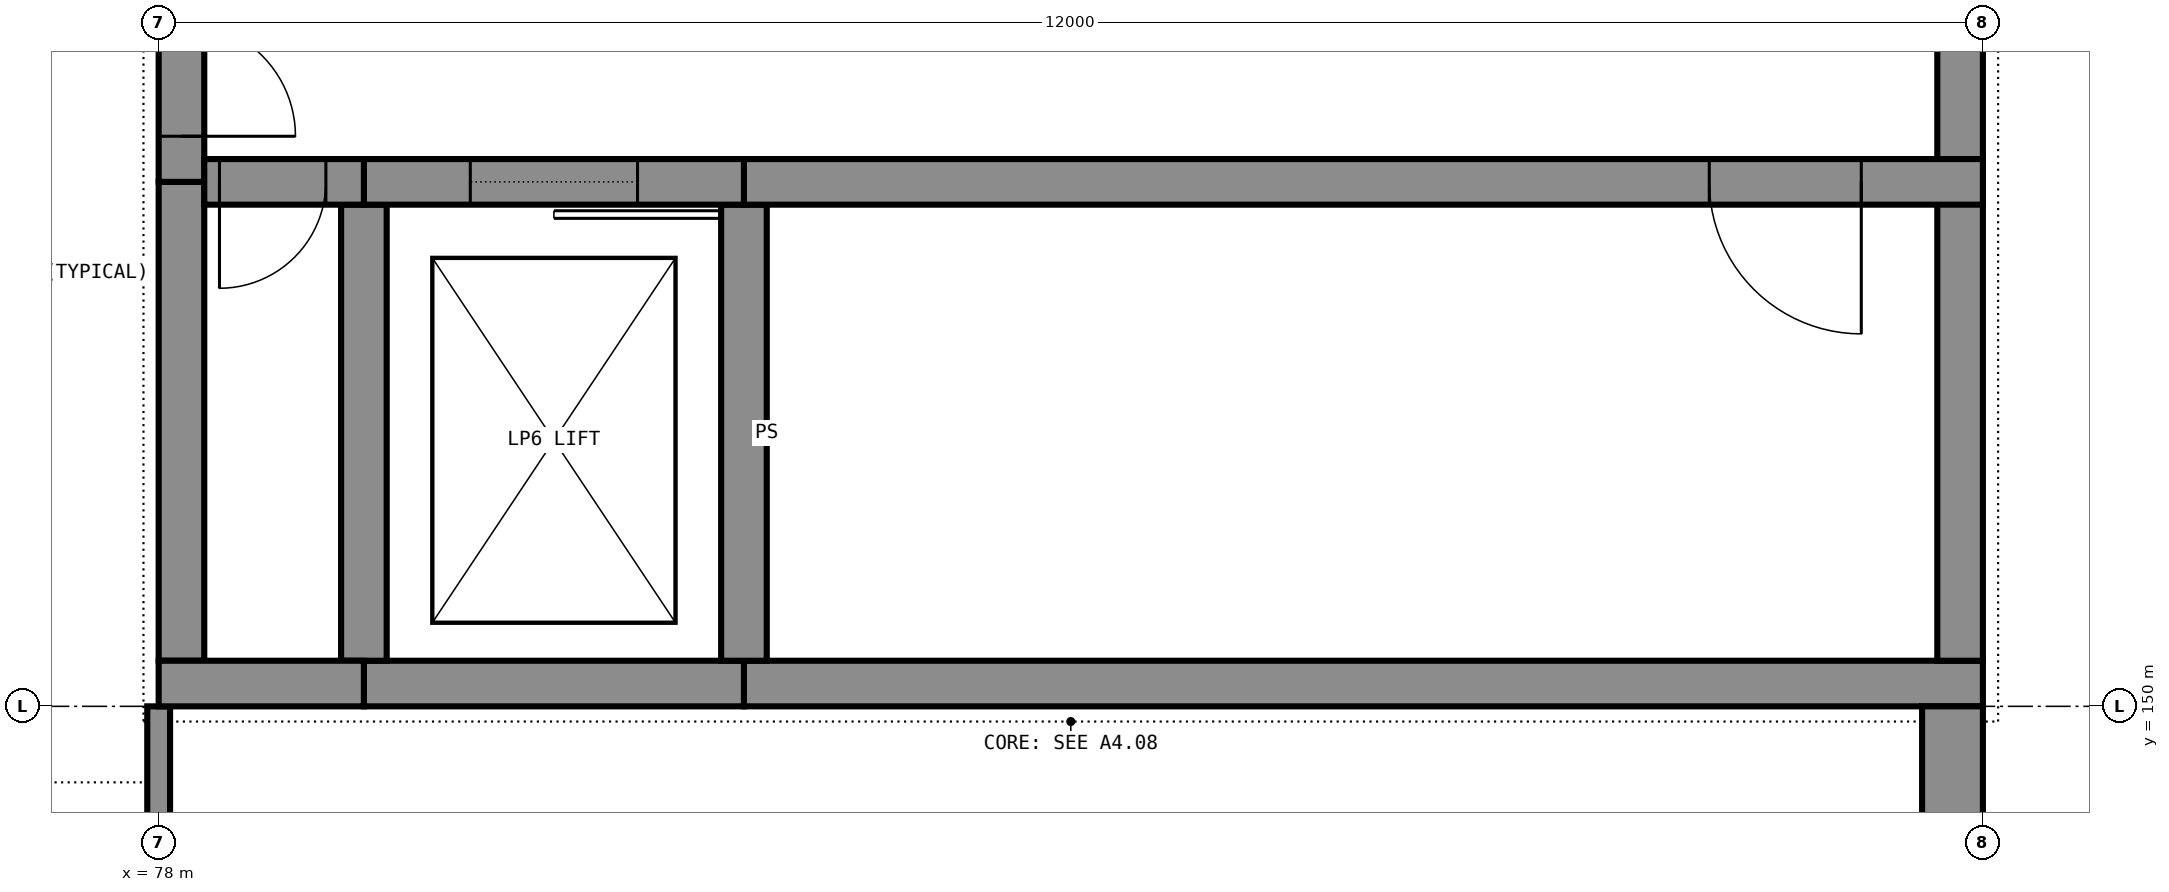
"""IFC4 building model, lengths in metres.
Left out: names, types, materials, properties, quantities, classifications, styles, units other than length and angle.
Written with IfcOpenShell. Run it as: python <this file> out.ifc"""

import sys

from ifc_helpers import new_model, si_unit, direction, frame, frame_2d, origin, place, context, subcontext, project, spatial, rectangle, extrude, element, fill, save


model = new_model("IFC4")
c1 = context("Model", 3, precision=1e-05, world=origin(), true_north=direction((0.0, 1.0)))
c2 = subcontext(c1, "Body", "Model", "MODEL_VIEW")
j1 = project(units=[si_unit("LENGTHUNIT", "METRE"), si_unit("PLANEANGLEUNIT", "RADIAN")], contexts=[c1])
p1 = place(None, origin())
s1 = spatial("IfcSite", under=j1, at=p1, CompositionType="ELEMENT")
p2 = place(p1, origin())
s2 = spatial("IfcBuilding", under=s1, at=p2, CompositionType="ELEMENT")
p3 = place(p2, frame((0.0, 0.0, -6.0)))
s3 = spatial("IfcBuildingStorey", under=s2, at=p3, CompositionType="ELEMENT", Elevation=-6.0)
p4 = place(p3, frame((90.0, 150.15, 0.0), z_axis=(0.0, 0.0, 1.0), x_axis=(-1.0, 0.0, 0.0)))
e1 = element("IfcWall", 1, at=p4, inside=s3, PredefinedType="SHEAR", context=c2, shape_type="SweptSolid", body=[
    extrude(rectangle(XDim=8.15, YDim=0.3, at=frame_2d((4.075, 0.0))), origin(), (0.0, 0.0, 1.0), 5.7),
])
p5 = place(p3, frame((81.85, 150.15, 0.0), z_axis=(0.0, 0.0, 1.0), x_axis=(-1.0, 0.0, 0.0)))
e2 = element("IfcWall", 2, at=p5, inside=s3, PredefinedType="SHEAR", context=c2, shape_type="SweptSolid", body=[
    extrude(rectangle(XDim=2.5, YDim=0.3, at=frame_2d((1.25, 0.0))), origin(), (0.0, 0.0, 1.0), 5.7),
])
p6 = place(p3, frame((79.35, 150.15, 0.0), z_axis=(0.0, 0.0, 1.0), x_axis=(-1.0, 0.0, 0.0)))
e3 = element("IfcWall", 3, at=p6, inside=s3, PredefinedType="SHEAR", context=c2, shape_type="SweptSolid", body=[
    extrude(rectangle(XDim=1.35, YDim=0.3, at=frame_2d((0.675, 0.0))), origin(), (0.0, 0.0, 1.0), 5.7),
])
p7 = place(p3, frame((90.0, 153.45, 0.0), z_axis=(0.0, 0.0, 1.0), x_axis=(-1.0, 0.0, 0.0)))
e4 = element("IfcWall", 4, at=p7, inside=s3, PredefinedType="SHEAR", context=c2, shape_type="SweptSolid", body=[
    extrude(rectangle(XDim=8.15, YDim=0.3, at=frame_2d((4.075, 0.0))), origin(), (0.0, 0.0, 1.0), 5.7),
])
p8 = place(p7, frame((0.8, 0.0, 0.0)))
e5 = element("IfcOpeningElement", 5, at=p8, cuts=e4, PredefinedType="OPENING", context=c2, shape_type="SweptSolid", body=[
    extrude(rectangle(XDim=1.0, YDim=2.1, at=frame_2d((0.5, 1.05))), frame((0.0, 0.16, 0.0), z_axis=(0.0, -1.0, 0.0), x_axis=(1.0, 0.0, 0.0)), (0.0, 0.0, 1.0), 0.32),
])
p9 = place(p3, frame((81.85, 153.45, 0.0), z_axis=(0.0, 0.0, 1.0), x_axis=(-1.0, 0.0, 0.0)))
e6 = element("IfcWall", 6, at=p9, inside=s3, PredefinedType="SHEAR", context=c2, shape_type="SweptSolid", body=[
    extrude(rectangle(XDim=2.5, YDim=0.3, at=frame_2d((1.25, 0.0))), origin(), (0.0, 0.0, 1.0), 5.7),
])
p10 = place(p9, frame((0.7, 0.0, 0.0)))
e7 = element("IfcOpeningElement", 7, at=p10, cuts=e6, PredefinedType="OPENING", context=c2, shape_type="SweptSolid", body=[
    extrude(rectangle(XDim=1.1, YDim=2.1, at=frame_2d((0.55, 1.05))), frame((0.0, 0.16, 0.0), z_axis=(0.0, -1.0, 0.0), x_axis=(1.0, 0.0, 0.0)), (0.0, 0.0, 1.0), 0.32),
])
p11 = place(p3, frame((79.35, 153.45, 0.0), z_axis=(0.0, 0.0, 1.0), x_axis=(-1.0, 0.0, 0.0)))
e8 = element("IfcWall", 8, at=p11, inside=s3, PredefinedType="SHEAR", context=c2, shape_type="SweptSolid", body=[
    extrude(rectangle(XDim=1.05, YDim=0.3, at=frame_2d((0.525, 0.0))), origin(), (0.0, 0.0, 1.0), 5.7),
])
p12 = place(p11, frame((0.25, 0.0, 0.0)))
e9 = element("IfcOpeningElement", 9, at=p12, cuts=e8, PredefinedType="OPENING", context=c2, shape_type="SweptSolid", body=[
    extrude(rectangle(XDim=0.7, YDim=2.1, at=frame_2d((0.35, 1.05))), frame((0.0, 0.16, 0.0), z_axis=(0.0, -1.0, 0.0), x_axis=(1.0, 0.0, 0.0)), (0.0, 0.0, 1.0), 0.32),
])
p13 = place(p3, frame((89.85, 150.3, 0.0), z_axis=(0.0, 0.0, 1.0), x_axis=(0.0, 1.0, 0.0)))
e10 = element("IfcWall", 10, at=p13, inside=s3, PredefinedType="SHEAR", context=c2, shape_type="SweptSolid", body=[
    extrude(rectangle(XDim=3.15, YDim=0.3, at=frame_2d((1.575, 0.0))), origin(), (0.0, 0.0, 1.0), 5.7),
])
p14 = place(p3, frame((89.85, 153.45, 0.0), z_axis=(0.0, 0.0, 1.0), x_axis=(0.0, 1.0, 0.0)))
e11 = element("IfcWall", 11, at=p14, inside=s3, PredefinedType="SHEAR", context=c2, shape_type="SweptSolid", body=[
    extrude(rectangle(XDim=5.1, YDim=0.3, at=frame_2d((2.55, 0.0))), origin(), (0.0, 0.0, 1.0), 5.7),
])
p15 = place(p3, frame((78.15, 150.3, 0.0), z_axis=(0.0, 0.0, 1.0), x_axis=(0.0, 1.0, 0.0)))
e12 = element("IfcWall", 12, at=p15, inside=s3, PredefinedType="SHEAR", context=c2, shape_type="SweptSolid", body=[
    extrude(rectangle(XDim=3.15, YDim=0.3, at=frame_2d((1.575, 0.0))), origin(), (0.0, 0.0, 1.0), 5.7),
])
p16 = place(p3, frame((78.15, 153.45, 0.0), z_axis=(0.0, 0.0, 1.0), x_axis=(0.0, 1.0, 0.0)))
e13 = element("IfcWall", 13, at=p16, inside=s3, PredefinedType="SHEAR", context=c2, shape_type="SweptSolid", body=[
    extrude(rectangle(XDim=5.1, YDim=0.3, at=frame_2d((2.55, 0.0))), origin(), (0.0, 0.0, 1.0), 5.7),
])
p17 = place(p16, frame((0.3, 0.0, 0.0)))
e14 = element("IfcOpeningElement", 14, at=p17, cuts=e13, PredefinedType="OPENING", context=c2, shape_type="SweptSolid", body=[
    extrude(rectangle(XDim=1.5, YDim=2.1, at=frame_2d((0.75, 1.05))), frame((0.0, 0.16, 0.0), z_axis=(0.0, -1.0, 0.0), x_axis=(1.0, 0.0, 0.0)), (0.0, 0.0, 1.0), 0.32),
])
for number, where, z_axis, x_axis in (
    (15, (81.85, 150.3, 0.0), (0.0, 0.0, 1.0), (0.0, 1.0, 0.0)),
    (16, (79.35, 150.3, 0.0), (0.0, 0.0, 1.0), (0.0, 1.0, 0.0)),
):
    element("IfcWall", number, at=place(p3, frame(where, z_axis=z_axis, x_axis=x_axis)), inside=s3, PredefinedType="SHEAR", context=c2, shape_type="SweptSolid", body=[
        extrude(rectangle(XDim=3.0, YDim=0.3, at=frame_2d((1.5, 0.0))), origin(), (0.0, 0.0, 1.0), 5.7),
    ])
p18 = place(p3, frame((89.8, 138.5, 0.0), z_axis=(0.0, 0.0, 1.0), x_axis=(0.0, 1.0, 0.0)))
e17 = element("IfcWall", 17, at=p18, inside=s3, PredefinedType="SOLIDWALL", context=c2, shape_type="SweptSolid", body=[
    extrude(rectangle(XDim=11.5, YDim=0.4, at=frame_2d((5.75, 0.0))), origin(), (0.0, 0.0, 1.0), 5.7),
])
p19 = place(p3, frame((78.0, 120.1, 0.0), z_axis=(0.0, 0.0, 1.0), x_axis=(0.0, 1.0, 0.0)))
e18 = element("IfcWall", 18, at=p19, inside=s3, PredefinedType="PARTITIONING", context=c2, shape_type="SweptSolid", body=[
    extrude(rectangle(XDim=29.9, YDim=0.15, at=frame_2d((14.95, 0.0))), origin(), (0.0, 0.0, 1.0), 4.7),
])
p20 = place(p19, frame((13.15, 0.0, 0.0)))
e19 = element("IfcOpeningElement", 19, at=p20, cuts=e18, PredefinedType="OPENING", context=c2, shape_type="SweptSolid", body=[
    extrude(rectangle(XDim=3.5, YDim=2.1, at=frame_2d((1.75, 1.05))), frame((0.0, 0.085, 0.0), z_axis=(0.0, -1.0, 0.0), x_axis=(1.0, 0.0, 0.0)), (0.0, 0.0, 1.0), 0.17),
])
p21 = place(p12, origin())
e20 = element("IfcDoor", 20, at=p21, inside=s3, OperationType="SINGLE_SWING_LEFT", PredefinedType="DOOR", context=c2, shape_type="SweptSolid", body=[
    extrude(rectangle(XDim=0.7, YDim=2.1, at=frame_2d((0.35, 1.05))), frame((0.0, 0.025, 0.0), z_axis=(0.0, -1.0, 0.0), x_axis=(1.0, 0.0, 0.0)), (0.0, 0.0, 1.0), 0.05),
])
fill(e9, e20)
p22 = place(p10, origin())
e21 = element("IfcDoor", 21, at=p22, inside=s3, OperationType="SLIDING_TO_LEFT", PredefinedType="DOOR", context=c2, shape_type="SweptSolid", body=[
    extrude(rectangle(XDim=1.1, YDim=2.1, at=frame_2d((0.55, 1.05))), frame((0.0, 0.025, 0.0), z_axis=(0.0, -1.0, 0.0), x_axis=(1.0, 0.0, 0.0)), (0.0, 0.0, 1.0), 0.05),
])
fill(e7, e21)
p23 = place(p8, origin())
e22 = element("IfcDoor", 22, at=p23, inside=s3, OperationType="SINGLE_SWING_RIGHT", PredefinedType="DOOR", context=c2, shape_type="SweptSolid", body=[
    extrude(rectangle(XDim=1.0, YDim=2.1, at=frame_2d((0.5, 1.05))), frame((0.0, 0.025, 0.0), z_axis=(0.0, -1.0, 0.0), x_axis=(1.0, 0.0, 0.0)), (0.0, 0.0, 1.0), 0.05),
])
fill(e5, e22)
p24 = place(p17, frame((1.5, 0.0, 0.0), z_axis=(0.0, 0.0, 1.0), x_axis=(-1.0, 0.0, 0.0)))
e23 = element("IfcDoor", 23, at=p24, inside=s3, OperationType="DOUBLE_DOOR_SINGLE_SWING", PredefinedType="DOOR", context=c2, shape_type="SweptSolid", body=[
    extrude(rectangle(XDim=1.5, YDim=2.1, at=frame_2d((0.75, 1.05))), frame((0.0, 0.025, 0.0), z_axis=(0.0, -1.0, 0.0), x_axis=(1.0, 0.0, 0.0)), (0.0, 0.0, 1.0), 0.05),
])
fill(e14, e23)
save(model, sys.argv[1])
